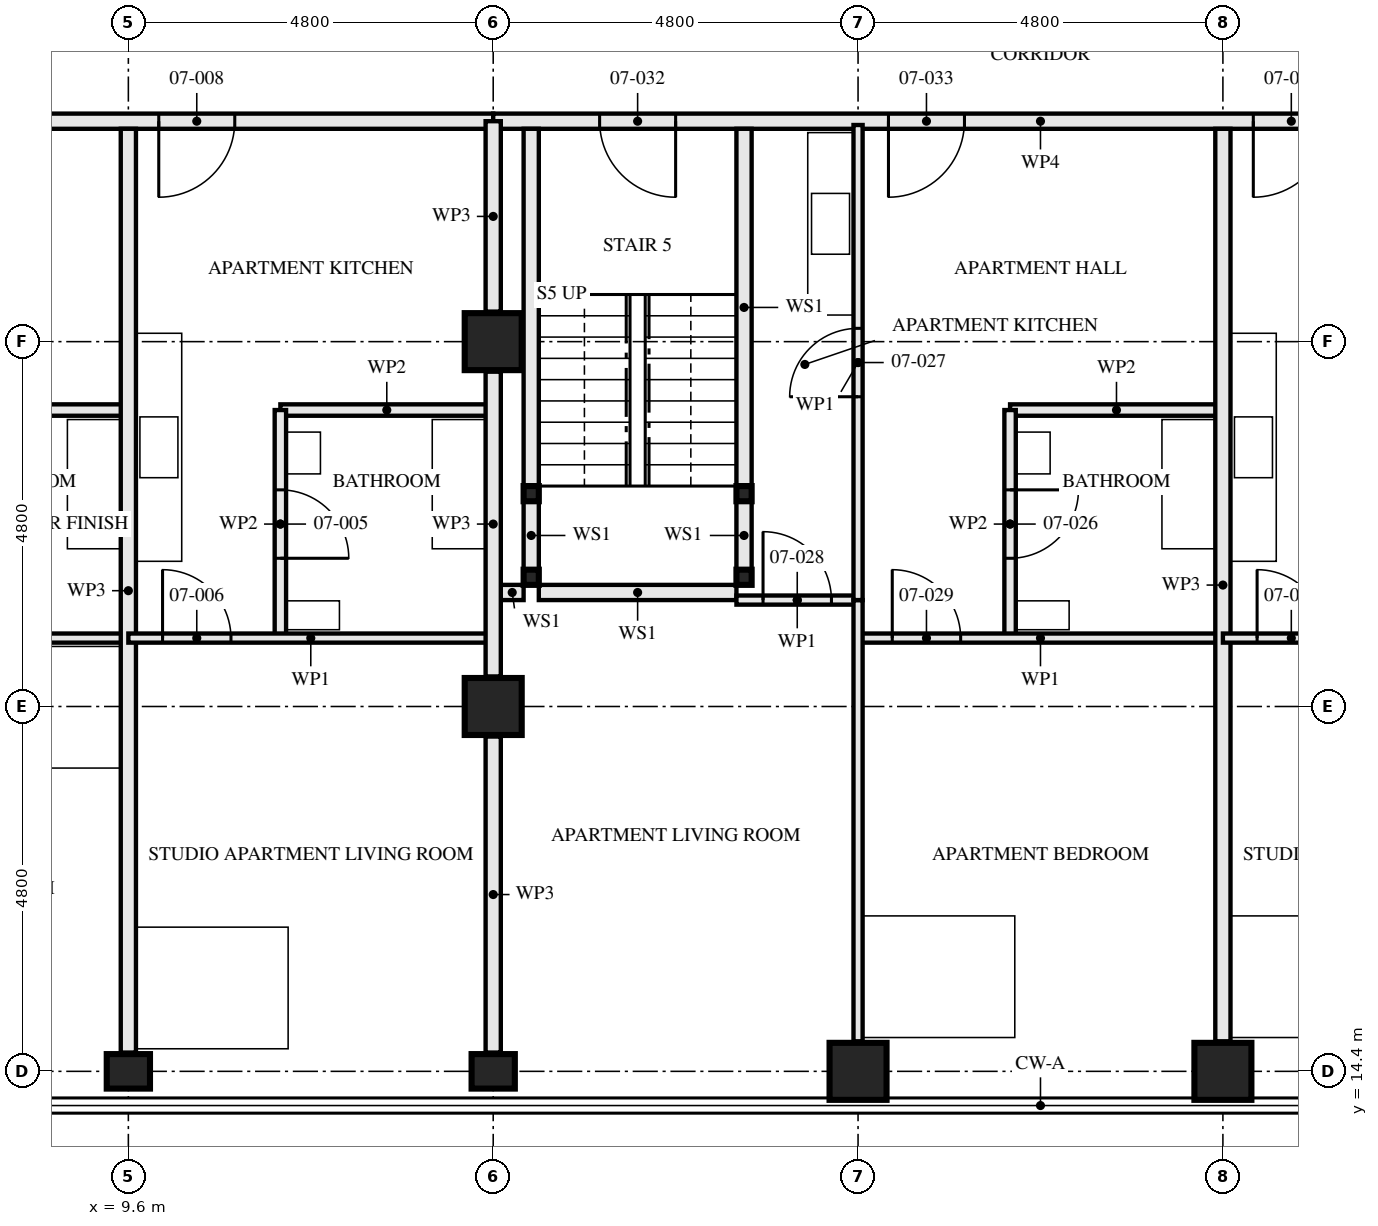
"""IFC4 building model, lengths in metres.
Left out: names, types, materials, properties, quantities, classifications, styles, units other than length and angle.
Written with IfcOpenShell. Run it as: python <this file> out.ifc"""

import sys

from ifc_helpers import new_model, si_unit, direction, frame, frame_2d, origin, origin_2d, place, context, subcontext, project, spatial, rectangle, hollow_rectangle, i_section, extrude, element, fill, save


model = new_model("IFC4")
c1 = context("Model", 3, precision=1e-05, world=origin(), true_north=direction((0.0, 1.0)))
c2 = subcontext(c1, "Body", "Model", "MODEL_VIEW")
j1 = project(units=[si_unit("LENGTHUNIT", "METRE"), si_unit("PLANEANGLEUNIT", "RADIAN")], contexts=[c1])
p1 = place(None, origin())
s1 = spatial("IfcSite", under=j1, at=p1, CompositionType="ELEMENT")
p2 = place(p1, origin())
s2 = spatial("IfcBuilding", under=s1, at=p2, CompositionType="ELEMENT")
p3 = place(p2, frame((0.0, 0.0, 30.5)))
s3 = spatial("IfcBuildingStorey", under=s2, at=p3, CompositionType="ELEMENT", Elevation=30.5)
for number, where, z_axis, x_axis in (
    (1, (9.6, 14.4, 0.0), (0.0, 0.0, 1.0), (0.0, 1.0, 0.0)),
    (2, (14.4, 14.4, 0.0), (0.0, 0.0, 1.0), (0.0, 1.0, 0.0)),
):
    element("IfcColumn", number, at=place(p3, frame(where, z_axis=z_axis, x_axis=x_axis)), inside=s3, PredefinedType="COLUMN", context=c2, shape_type="SweptSolid", body=[
        extrude(i_section(OverallWidth=0.454, OverallDepth=0.569, WebThickness=0.078, FlangeThickness=0.125, FilletRadius=0.015, at=origin_2d()), origin(), (0.0, 0.0, 1.0), 3.5),
    ])
for number, where, z_axis, x_axis in (
    (3, (14.4, 19.2, 0.0), (0.0, 0.0, 1.0), (1.0, 0.0, 0.0)),
    (4, (14.4, 24.0, 0.0), (0.0, 0.0, 1.0), (1.0, 0.0, 0.0)),
    (5, (19.2, 14.4, 0.0), (0.0, 0.0, 1.0), (0.0, 1.0, 0.0)),
    (6, (24.0, 14.4, 0.0), (0.0, 0.0, 1.0), (0.0, 1.0, 0.0)),
):
    element("IfcColumn", number, at=place(p3, frame(where, z_axis=z_axis, x_axis=x_axis)), inside=s3, PredefinedType="COLUMN", context=c2, shape_type="SweptSolid", body=[
        extrude(hollow_rectangle(XDim=0.75, YDim=0.75, WallThickness=0.08, at=origin_2d()), origin(), (0.0, 0.0, 1.0), 3.5),
    ])
for number, where, z_axis, x_axis in (
    (7, (14.9, 20.9, 0.0), (0.0, 0.0, 1.0), (1.0, 0.0, 0.0)),
    (8, (17.7, 20.9, 0.0), (0.0, 0.0, 1.0), (1.0, 0.0, 0.0)),
    (9, (14.9, 22.0, 0.0), (0.0, 0.0, 1.0), (1.0, 0.0, 0.0)),
    (10, (17.7, 22.0, 0.0), (0.0, 0.0, 1.0), (1.0, 0.0, 0.0)),
):
    element("IfcColumn", number, at=place(p3, frame(where, z_axis=z_axis, x_axis=x_axis)), inside=s3, PredefinedType="COLUMN", context=c2, shape_type="SweptSolid", body=[
        extrude(hollow_rectangle(XDim=0.2, YDim=0.2, WallThickness=0.008, at=origin_2d()), origin(), (0.0, 0.0, 1.0), 3.33),
    ])
p4 = place(p3, frame((6.8, 23.1, 0.0), z_axis=(0.0, 0.0, 1.0), x_axis=(1.0, 0.0, 0.0)))
e11 = element("IfcWall", 11, at=p4, inside=s3, PredefinedType="PARTITIONING", context=c2, shape_type="SweptSolid", body=[
    extrude(rectangle(XDim=2.8, YDim=0.15, at=frame_2d((1.4, 0.0))), origin(), (0.0, 0.0, 1.0), 3.33),
])
p5 = place(p3, frame((4.8, 20.1, 0.0), z_axis=(0.0, 0.0, 1.0), x_axis=(1.0, 0.0, 0.0)))
e12 = element("IfcWall", 12, at=p5, inside=s3, PredefinedType="PARTITIONING", context=c2, shape_type="SweptSolid", body=[
    extrude(rectangle(XDim=4.8, YDim=0.12, at=frame_2d((2.4, 0.0))), origin(), (0.0, 0.0, 1.0), 3.33),
])
p6 = place(p5, frame((0.45, 0.0, 0.0)))
e13 = element("IfcOpeningElement", 13, at=p6, cuts=e12, PredefinedType="OPENING", context=c2, shape_type="SweptSolid", body=[
    extrude(rectangle(XDim=0.9, YDim=2.1, at=frame_2d((0.45, 1.05))), frame((0.0, 0.071, 0.0), z_axis=(0.0, -1.0, 0.0), x_axis=(1.0, 0.0, 0.0)), (0.0, 0.0, 1.0), 0.141),
])
p7 = place(p3, frame((9.6, 14.647, 0.0), z_axis=(0.0, 0.0, 1.0), x_axis=(0.0, 1.0, 0.0)))
e14 = element("IfcWall", 14, at=p7, inside=s3, PredefinedType="PARTITIONING", context=c2, shape_type="SweptSolid", body=[
    extrude(rectangle(XDim=12.153, YDim=0.2, at=frame_2d((6.077, 0.0))), origin(), (0.0, 0.0, 1.0), 2.55),
])
p8 = place(p3, frame((11.6, 20.1, 0.0), z_axis=(0.0, 0.0, 1.0), x_axis=(0.0, 1.0, 0.0)))
e15 = element("IfcWall", 15, at=p8, inside=s3, PredefinedType="PARTITIONING", context=c2, shape_type="SweptSolid", body=[
    extrude(rectangle(XDim=3.0, YDim=0.15, at=frame_2d((1.5, 0.0))), origin(), (0.0, 0.0, 1.0), 3.33),
])
p9 = place(p8, frame((1.05, 0.0, 0.0)))
e16 = element("IfcOpeningElement", 16, at=p9, cuts=e15, PredefinedType="OPENING", context=c2, shape_type="SweptSolid", body=[
    extrude(rectangle(XDim=0.9, YDim=2.1, at=frame_2d((0.45, 1.05))), frame((0.0, 0.085, 0.0), z_axis=(0.0, -1.0, 0.0), x_axis=(1.0, 0.0, 0.0)), (0.0, 0.0, 1.0), 0.171),
])
p10 = place(p3, frame((11.6, 23.1, 0.0), z_axis=(0.0, 0.0, 1.0), x_axis=(1.0, 0.0, 0.0)))
e17 = element("IfcWall", 17, at=p10, inside=s3, PredefinedType="PARTITIONING", context=c2, shape_type="SweptSolid", body=[
    extrude(rectangle(XDim=2.8, YDim=0.15, at=frame_2d((1.4, 0.0))), origin(), (0.0, 0.0, 1.0), 3.33),
])
p11 = place(p3, frame((9.6, 20.1, 0.0), z_axis=(0.0, 0.0, 1.0), x_axis=(1.0, 0.0, 0.0)))
e18 = element("IfcWall", 18, at=p11, inside=s3, PredefinedType="PARTITIONING", context=c2, shape_type="SweptSolid", body=[
    extrude(rectangle(XDim=4.8, YDim=0.12, at=frame_2d((2.4, 0.0))), origin(), (0.0, 0.0, 1.0), 3.33),
])
p12 = place(p11, frame((0.45, 0.0, 0.0)))
e19 = element("IfcOpeningElement", 19, at=p12, cuts=e18, PredefinedType="OPENING", context=c2, shape_type="SweptSolid", body=[
    extrude(rectangle(XDim=0.9, YDim=2.1, at=frame_2d((0.45, 1.05))), frame((0.0, 0.071, 0.0), z_axis=(0.0, -1.0, 0.0), x_axis=(1.0, 0.0, 0.0)), (0.0, 0.0, 1.0), 0.141),
])
p13 = place(p3, frame((4.8, 26.9, 0.0), z_axis=(0.0, 0.0, 1.0), x_axis=(1.0, 0.0, 0.0)))
e20 = element("IfcWall", 20, at=p13, inside=s3, PredefinedType="PARTITIONING", context=c2, shape_type="SweptSolid", body=[
    extrude(rectangle(XDim=9.6, YDim=0.2, at=frame_2d((4.8, 0.0))), origin(), (0.0, 0.0, 1.0), 3.33),
])
p14 = place(p13, frame((0.4, 0.0, 0.0)))
e21 = element("IfcOpeningElement", 21, at=p14, cuts=e20, PredefinedType="OPENING", context=c2, shape_type="SweptSolid", body=[
    extrude(rectangle(XDim=1.0, YDim=2.1, at=frame_2d((0.5, 1.05))), frame((0.0, 0.111, 0.0), z_axis=(0.0, -1.0, 0.0), x_axis=(1.0, 0.0, 0.0)), (0.0, 0.0, 1.0), 0.221),
])
p15 = place(p13, frame((5.2, 0.0, 0.0)))
e22 = element("IfcOpeningElement", 22, at=p15, cuts=e20, PredefinedType="OPENING", context=c2, shape_type="SweptSolid", body=[
    extrude(rectangle(XDim=1.0, YDim=2.1, at=frame_2d((0.5, 1.05))), frame((0.0, 0.111, 0.0), z_axis=(0.0, -1.0, 0.0), x_axis=(1.0, 0.0, 0.0)), (0.0, 0.0, 1.0), 0.221),
])
p16 = place(p3, frame((14.9, 21.0, 0.0), z_axis=(0.0, 0.0, 1.0), x_axis=(0.0, 1.0, 0.0)))
e23 = element("IfcWall", 23, at=p16, inside=s3, PredefinedType="SOLIDWALL", context=c2, shape_type="SweptSolid", body=[
    extrude(rectangle(XDim=0.9, YDim=0.2, at=frame_2d((0.45, 0.0))), origin(), (0.0, 0.0, 1.0), 2.99),
])
p17 = place(p3, frame((14.9, 22.1, 0.0), z_axis=(0.0, 0.0, 1.0), x_axis=(0.0, 1.0, 0.0)))
e24 = element("IfcWall", 24, at=p17, inside=s3, PredefinedType="SOLIDWALL", context=c2, shape_type="SweptSolid", body=[
    extrude(rectangle(XDim=4.7, YDim=0.2, at=frame_2d((2.35, 0.0))), origin(), (0.0, 0.0, 1.0), 2.99),
])
p18 = place(p3, frame((17.7, 21.0, 0.0), z_axis=(0.0, 0.0, 1.0), x_axis=(0.0, 1.0, 0.0)))
e25 = element("IfcWall", 25, at=p18, inside=s3, PredefinedType="SOLIDWALL", context=c2, shape_type="SweptSolid", body=[
    extrude(rectangle(XDim=0.9, YDim=0.2, at=frame_2d((0.45, 0.0))), origin(), (0.0, 0.0, 1.0), 2.99),
])
p19 = place(p3, frame((17.7, 22.1, 0.0), z_axis=(0.0, 0.0, 1.0), x_axis=(0.0, 1.0, 0.0)))
e26 = element("IfcWall", 26, at=p19, inside=s3, PredefinedType="SOLIDWALL", context=c2, shape_type="SweptSolid", body=[
    extrude(rectangle(XDim=4.7, YDim=0.2, at=frame_2d((2.35, 0.0))), origin(), (0.0, 0.0, 1.0), 2.99),
])
p20 = place(p3, frame((14.5, 20.7, 0.0), z_axis=(0.0, 0.0, 1.0), x_axis=(1.0, 0.0, 0.0)))
e27 = element("IfcWall", 27, at=p20, inside=s3, PredefinedType="SOLIDWALL", context=c2, shape_type="SweptSolid", body=[
    extrude(rectangle(XDim=0.3, YDim=0.2, at=frame_2d((0.15, 0.0))), origin(), (0.0, 0.0, 1.0), 3.33),
])
p21 = place(p3, frame((15.0, 20.7, 0.0), z_axis=(0.0, 0.0, 1.0), x_axis=(1.0, 0.0, 0.0)))
e28 = element("IfcWall", 28, at=p21, inside=s3, PredefinedType="SOLIDWALL", context=c2, shape_type="SweptSolid", body=[
    extrude(rectangle(XDim=2.6, YDim=0.2, at=frame_2d((1.3, 0.0))), origin(), (0.0, 0.0, 1.0), 3.33),
])
p22 = place(p3, frame((21.2, 20.1, 0.0), z_axis=(0.0, 0.0, 1.0), x_axis=(0.0, 1.0, 0.0)))
e29 = element("IfcWall", 29, at=p22, inside=s3, PredefinedType="PARTITIONING", context=c2, shape_type="SweptSolid", body=[
    extrude(rectangle(XDim=3.0, YDim=0.15, at=frame_2d((1.5, 0.0))), origin(), (0.0, 0.0, 1.0), 3.33),
])
p23 = place(p22, frame((1.05, 0.0, 0.0)))
e30 = element("IfcOpeningElement", 30, at=p23, cuts=e29, PredefinedType="OPENING", context=c2, shape_type="SweptSolid", body=[
    extrude(rectangle(XDim=0.9, YDim=2.1, at=frame_2d((0.45, 1.05))), frame((0.0, 0.085, 0.0), z_axis=(0.0, -1.0, 0.0), x_axis=(1.0, 0.0, 0.0)), (0.0, 0.0, 1.0), 0.171),
])
p24 = place(p3, frame((21.2, 23.1, 0.0), z_axis=(0.0, 0.0, 1.0), x_axis=(1.0, 0.0, 0.0)))
e31 = element("IfcWall", 31, at=p24, inside=s3, PredefinedType="PARTITIONING", context=c2, shape_type="SweptSolid", body=[
    extrude(rectangle(XDim=2.8, YDim=0.15, at=frame_2d((1.4, 0.0))), origin(), (0.0, 0.0, 1.0), 3.33),
])
p25 = place(p3, frame((19.2, 20.6, 0.0), z_axis=(0.0, 0.0, 1.0), x_axis=(0.0, 1.0, 0.0)))
e32 = element("IfcWall", 32, at=p25, inside=s3, PredefinedType="PARTITIONING", context=c2, shape_type="SweptSolid", body=[
    extrude(rectangle(XDim=6.25, YDim=0.12, at=frame_2d((3.125, 0.0))), origin(), (0.0, 0.0, 1.0), 2.55),
])
p26 = place(p25, frame((2.675, 0.0, 0.0)))
e33 = element("IfcOpeningElement", 33, at=p26, cuts=e32, PredefinedType="OPENING", context=c2, shape_type="SweptSolid", body=[
    extrude(rectangle(XDim=0.9, YDim=2.1, at=frame_2d((0.45, 1.05))), frame((0.0, 0.071, 0.0), z_axis=(0.0, -1.0, 0.0), x_axis=(1.0, 0.0, 0.0)), (0.0, 0.0, 1.0), 0.141),
])
p27 = place(p3, frame((17.6, 20.6, 0.0), z_axis=(0.0, 0.0, 1.0), x_axis=(1.0, 0.0, 0.0)))
e34 = element("IfcWall", 34, at=p27, inside=s3, PredefinedType="PARTITIONING", context=c2, shape_type="SweptSolid", body=[
    extrude(rectangle(XDim=1.6, YDim=0.12, at=frame_2d((0.8, 0.0))), origin(), (0.0, 0.0, 1.0), 3.33),
])
p28 = place(p27, frame((0.35, 0.0, 0.0)))
e35 = element("IfcOpeningElement", 35, at=p28, cuts=e34, PredefinedType="OPENING", context=c2, shape_type="SweptSolid", body=[
    extrude(rectangle(XDim=0.9, YDim=2.1, at=frame_2d((0.45, 1.05))), frame((0.0, 0.071, 0.0), z_axis=(0.0, -1.0, 0.0), x_axis=(1.0, 0.0, 0.0)), (0.0, 0.0, 1.0), 0.141),
])
p29 = place(p3, frame((19.2, 20.1, 0.0), z_axis=(0.0, 0.0, 1.0), x_axis=(1.0, 0.0, 0.0)))
e36 = element("IfcWall", 36, at=p29, inside=s3, PredefinedType="PARTITIONING", context=c2, shape_type="SweptSolid", body=[
    extrude(rectangle(XDim=4.8, YDim=0.12, at=frame_2d((2.4, 0.0))), origin(), (0.0, 0.0, 1.0), 3.33),
])
p30 = place(p29, frame((0.45, 0.0, 0.0)))
e37 = element("IfcOpeningElement", 37, at=p30, cuts=e36, PredefinedType="OPENING", context=c2, shape_type="SweptSolid", body=[
    extrude(rectangle(XDim=0.9, YDim=2.1, at=frame_2d((0.45, 1.05))), frame((0.0, 0.071, 0.0), z_axis=(0.0, -1.0, 0.0), x_axis=(1.0, 0.0, 0.0)), (0.0, 0.0, 1.0), 0.141),
])
p31 = place(p3, frame((19.2, 14.795, 0.0), z_axis=(0.0, 0.0, 1.0), x_axis=(0.0, 1.0, 0.0)))
e38 = element("IfcWall", 38, at=p31, inside=s3, PredefinedType="PARTITIONING", context=c2, shape_type="SweptSolid", body=[
    extrude(rectangle(XDim=5.805, YDim=0.12, at=frame_2d((2.903, 0.0))), origin(), (0.0, 0.0, 1.0), 2.55),
])
p32 = place(p3, frame((24.0, 14.795, 0.0), z_axis=(0.0, 0.0, 1.0), x_axis=(0.0, 1.0, 0.0)))
e39 = element("IfcWall", 39, at=p32, inside=s3, PredefinedType="PARTITIONING", context=c2, shape_type="SweptSolid", body=[
    extrude(rectangle(XDim=12.005, YDim=0.2, at=frame_2d((6.002, 0.0))), origin(), (0.0, 0.0, 1.0), 2.55),
])
p33 = place(p3, frame((24.0, 20.1, 0.0), z_axis=(0.0, 0.0, 1.0), x_axis=(1.0, 0.0, 0.0)))
e40 = element("IfcWall", 40, at=p33, inside=s3, PredefinedType="PARTITIONING", context=c2, shape_type="SweptSolid", body=[
    extrude(rectangle(XDim=4.8, YDim=0.12, at=frame_2d((2.4, 0.0))), origin(), (0.0, 0.0, 1.0), 3.33),
])
p34 = place(p33, frame((0.45, 0.0, 0.0)))
e41 = element("IfcOpeningElement", 41, at=p34, cuts=e40, PredefinedType="OPENING", context=c2, shape_type="SweptSolid", body=[
    extrude(rectangle(XDim=0.9, YDim=2.1, at=frame_2d((0.45, 1.05))), frame((0.0, 0.071, 0.0), z_axis=(0.0, -1.0, 0.0), x_axis=(1.0, 0.0, 0.0)), (0.0, 0.0, 1.0), 0.141),
])
p35 = place(p3, frame((14.4, 26.9, 0.0), z_axis=(0.0, 0.0, 1.0), x_axis=(1.0, 0.0, 0.0)))
e42 = element("IfcWall", 42, at=p35, inside=s3, PredefinedType="PARTITIONING", context=c2, shape_type="SweptSolid", body=[
    extrude(rectangle(XDim=14.4, YDim=0.2, at=frame_2d((7.2, 0.0))), origin(), (0.0, 0.0, 1.0), 2.55),
])
p36 = place(p35, frame((1.4, 0.0, 0.0)))
e43 = element("IfcOpeningElement", 43, at=p36, cuts=e42, PredefinedType="OPENING", context=c2, shape_type="SweptSolid", body=[
    extrude(rectangle(XDim=1.0, YDim=2.1, at=frame_2d((0.5, 1.05))), frame((0.0, 0.111, 0.0), z_axis=(0.0, -1.0, 0.0), x_axis=(1.0, 0.0, 0.0)), (0.0, 0.0, 1.0), 0.221),
])
p37 = place(p35, frame((5.2, 0.0, 0.0)))
e44 = element("IfcOpeningElement", 44, at=p37, cuts=e42, PredefinedType="OPENING", context=c2, shape_type="SweptSolid", body=[
    extrude(rectangle(XDim=1.0, YDim=2.1, at=frame_2d((0.5, 1.05))), frame((0.0, 0.111, 0.0), z_axis=(0.0, -1.0, 0.0), x_axis=(1.0, 0.0, 0.0)), (0.0, 0.0, 1.0), 0.221),
])
p38 = place(p35, frame((10.0, 0.0, 0.0)))
e45 = element("IfcOpeningElement", 45, at=p38, cuts=e42, PredefinedType="OPENING", context=c2, shape_type="SweptSolid", body=[
    extrude(rectangle(XDim=1.0, YDim=2.1, at=frame_2d((0.5, 1.05))), frame((0.0, 0.111, 0.0), z_axis=(0.0, -1.0, 0.0), x_axis=(1.0, 0.0, 0.0)), (0.0, 0.0, 1.0), 0.221),
])
p39 = place(p3, frame((14.4, 14.647, 0.0), z_axis=(0.0, 0.0, 1.0), x_axis=(0.0, 1.0, 0.0)))
e46 = element("IfcWall", 46, at=p39, inside=s3, PredefinedType="PARTITIONING", context=c2, shape_type="SweptSolid", body=[
    extrude(rectangle(XDim=4.158, YDim=0.2, at=frame_2d((2.079, 0.0))), origin(), (0.0, 0.0, 1.0), 2.32),
])
p40 = place(p3, frame((14.4, 19.595, 0.0), z_axis=(0.0, 0.0, 1.0), x_axis=(0.0, 1.0, 0.0)))
e47 = element("IfcWall", 47, at=p40, inside=s3, PredefinedType="PARTITIONING", context=c2, shape_type="SweptSolid", body=[
    extrude(rectangle(XDim=4.01, YDim=0.2, at=frame_2d((2.005, 0.0))), origin(), (0.0, 0.0, 1.0), 2.32),
])
p41 = place(p3, frame((14.4, 24.395, 0.0), z_axis=(0.0, 0.0, 1.0), x_axis=(0.0, 1.0, 0.0)))
e48 = element("IfcWall", 48, at=p41, inside=s3, PredefinedType="PARTITIONING", context=c2, shape_type="SweptSolid", body=[
    extrude(rectangle(XDim=2.505, YDim=0.2, at=frame_2d((1.252, 0.0))), origin(), (0.0, 0.0, 1.0), 2.32),
])
p42 = place(p9, frame((0.9, 0.0, 0.0), z_axis=(0.0, 0.0, 1.0), x_axis=(-1.0, 0.0, 0.0)))
e49 = element("IfcDoor", 49, at=p42, inside=s3, OperationType="SINGLE_SWING_LEFT", PredefinedType="DOOR", context=c2, shape_type="SweptSolid", body=[
    extrude(rectangle(XDim=0.9, YDim=2.1, at=frame_2d((0.45, 1.05))), frame((0.0, 0.022, 0.0), z_axis=(0.0, -1.0, 0.0), x_axis=(1.0, 0.0, 0.0)), (0.0, 0.0, 1.0), 0.044),
])
fill(e16, e49)
p43 = place(p12, origin())
e50 = element("IfcDoor", 50, at=p43, inside=s3, OperationType="SINGLE_SWING_RIGHT", PredefinedType="DOOR", context=c2, shape_type="SweptSolid", body=[
    extrude(rectangle(XDim=0.9, YDim=2.1, at=frame_2d((0.45, 1.05))), frame((0.0, 0.022, 0.0), z_axis=(0.0, -1.0, 0.0), x_axis=(1.0, 0.0, 0.0)), (0.0, 0.0, 1.0), 0.044),
])
fill(e19, e50)
p44 = place(p15, frame((1.0, 0.0, 0.0), z_axis=(0.0, 0.0, 1.0), x_axis=(-1.0, 0.0, 0.0)))
e51 = element("IfcDoor", 51, at=p44, inside=s3, OperationType="SINGLE_SWING_LEFT", PredefinedType="DOOR", context=c2, shape_type="SweptSolid", body=[
    extrude(rectangle(XDim=1.0, YDim=2.1, at=frame_2d((0.5, 1.05))), frame((0.0, 0.027, 0.0), z_axis=(0.0, -1.0, 0.0), x_axis=(1.0, 0.0, 0.0)), (0.0, 0.0, 1.0), 0.054),
])
fill(e22, e51)
p45 = place(p23, frame((0.9, 0.0, 0.0), z_axis=(0.0, 0.0, 1.0), x_axis=(-1.0, 0.0, 0.0)))
e52 = element("IfcDoor", 52, at=p45, inside=s3, OperationType="SINGLE_SWING_RIGHT", PredefinedType="DOOR", context=c2, shape_type="SweptSolid", body=[
    extrude(rectangle(XDim=0.9, YDim=2.1, at=frame_2d((0.45, 1.05))), frame((0.0, 0.022, 0.0), z_axis=(0.0, -1.0, 0.0), x_axis=(1.0, 0.0, 0.0)), (0.0, 0.0, 1.0), 0.044),
])
fill(e30, e52)
p46 = place(p26, origin())
e53 = element("IfcDoor", 53, at=p46, inside=s3, OperationType="SINGLE_SWING_RIGHT", PredefinedType="DOOR", context=c2, shape_type="SweptSolid", body=[
    extrude(rectangle(XDim=0.9, YDim=2.1, at=frame_2d((0.45, 1.05))), frame((0.0, 0.022, 0.0), z_axis=(0.0, -1.0, 0.0), x_axis=(1.0, 0.0, 0.0)), (0.0, 0.0, 1.0), 0.044),
])
fill(e33, e53)
p47 = place(p28, origin())
e54 = element("IfcDoor", 54, at=p47, inside=s3, OperationType="SINGLE_SWING_RIGHT", PredefinedType="DOOR", context=c2, shape_type="SweptSolid", body=[
    extrude(rectangle(XDim=0.9, YDim=2.1, at=frame_2d((0.45, 1.05))), frame((0.0, 0.022, 0.0), z_axis=(0.0, -1.0, 0.0), x_axis=(1.0, 0.0, 0.0)), (0.0, 0.0, 1.0), 0.044),
])
fill(e35, e54)
p48 = place(p30, origin())
e55 = element("IfcDoor", 55, at=p48, inside=s3, OperationType="SINGLE_SWING_RIGHT", PredefinedType="DOOR", context=c2, shape_type="SweptSolid", body=[
    extrude(rectangle(XDim=0.9, YDim=2.1, at=frame_2d((0.45, 1.05))), frame((0.0, 0.022, 0.0), z_axis=(0.0, -1.0, 0.0), x_axis=(1.0, 0.0, 0.0)), (0.0, 0.0, 1.0), 0.044),
])
fill(e37, e55)
p49 = place(p34, origin())
e56 = element("IfcDoor", 56, at=p49, inside=s3, OperationType="SINGLE_SWING_RIGHT", PredefinedType="DOOR", context=c2, shape_type="SweptSolid", body=[
    extrude(rectangle(XDim=0.9, YDim=2.1, at=frame_2d((0.45, 1.05))), frame((0.0, 0.022, 0.0), z_axis=(0.0, -1.0, 0.0), x_axis=(1.0, 0.0, 0.0)), (0.0, 0.0, 1.0), 0.044),
])
fill(e41, e56)
p50 = place(p36, frame((1.0, 0.0, 0.0), z_axis=(0.0, 0.0, 1.0), x_axis=(-1.0, 0.0, 0.0)))
e57 = element("IfcDoor", 57, at=p50, inside=s3, OperationType="SINGLE_SWING_RIGHT", PredefinedType="DOOR", context=c2, shape_type="SweptSolid", body=[
    extrude(rectangle(XDim=1.0, YDim=2.1, at=frame_2d((0.5, 1.05))), frame((0.0, 0.032, 0.0), z_axis=(0.0, -1.0, 0.0), x_axis=(1.0, 0.0, 0.0)), (0.0, 0.0, 1.0), 0.064),
])
fill(e43, e57)
p51 = place(p37, frame((1.0, 0.0, 0.0), z_axis=(0.0, 0.0, 1.0), x_axis=(-1.0, 0.0, 0.0)))
e58 = element("IfcDoor", 58, at=p51, inside=s3, OperationType="SINGLE_SWING_LEFT", PredefinedType="DOOR", context=c2, shape_type="SweptSolid", body=[
    extrude(rectangle(XDim=1.0, YDim=2.1, at=frame_2d((0.5, 1.05))), frame((0.0, 0.027, 0.0), z_axis=(0.0, -1.0, 0.0), x_axis=(1.0, 0.0, 0.0)), (0.0, 0.0, 1.0), 0.054),
])
fill(e44, e58)
p52 = place(p38, frame((1.0, 0.0, 0.0), z_axis=(0.0, 0.0, 1.0), x_axis=(-1.0, 0.0, 0.0)))
e59 = element("IfcDoor", 59, at=p52, inside=s3, OperationType="SINGLE_SWING_LEFT", PredefinedType="DOOR", context=c2, shape_type="SweptSolid", body=[
    extrude(rectangle(XDim=1.0, YDim=2.1, at=frame_2d((0.5, 1.05))), frame((0.0, 0.027, 0.0), z_axis=(0.0, -1.0, 0.0), x_axis=(1.0, 0.0, 0.0)), (0.0, 0.0, 1.0), 0.054),
])
fill(e45, e59)
save(model, sys.argv[1])
